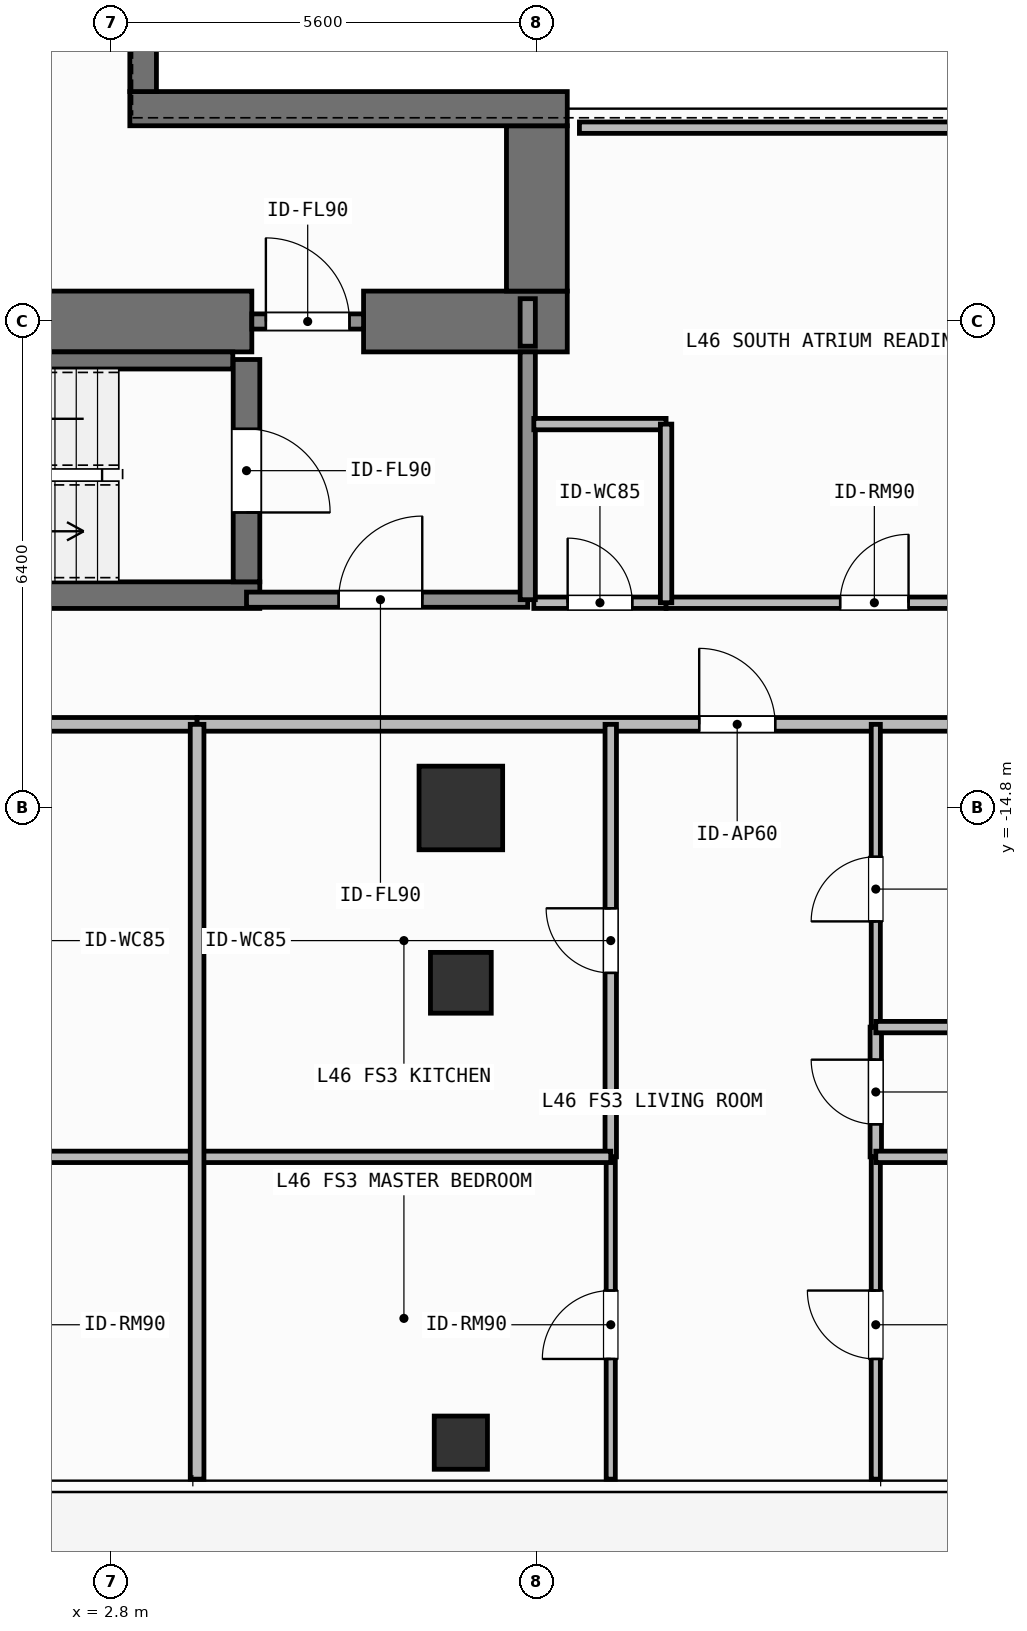
"""IFC4 building model, lengths in metres.
Left out: names, types, materials, properties, quantities, classifications, styles, units other than length and angle.
Written with IfcOpenShell. Run it as: python <this file> out.ifc"""

import sys

from ifc_helpers import new_model, si_unit, direction, frame, frame_2d, origin, origin_2d, place, context, subcontext, project, spatial, rectangle, hollow_rectangle, extrude, element, fill, save


model = new_model("IFC4")
c1 = context("Model", 3, precision=1e-05, world=origin(), true_north=direction((0.0, 1.0)))
c2 = subcontext(c1, "Body", "Model", "MODEL_VIEW")
j1 = project(units=[si_unit("LENGTHUNIT", "METRE"), si_unit("PLANEANGLEUNIT", "RADIAN")], contexts=[c1])
p1 = place(None, origin())
s1 = spatial("IfcSite", under=j1, at=p1, CompositionType="ELEMENT")
p2 = place(p1, origin())
s2 = spatial("IfcBuilding", under=s1, at=p2, CompositionType="ELEMENT")
p3 = place(p2, frame((0.0, 0.0, 187.5)))
s3 = spatial("IfcBuildingStorey", under=s2, at=p3, CompositionType="ELEMENT", Elevation=187.5)
p4 = place(p3, frame((-2.62, -8.4, 0.0), z_axis=(0.0, 0.0, 1.0), x_axis=(1.0, 0.0, 0.0)))
e1 = element("IfcWall", 1, at=p4, inside=s3, PredefinedType="SHEAR", context=c2, shape_type="SweptSolid", body=[
    extrude(rectangle(XDim=7.27, YDim=0.8, at=frame_2d((3.635, 0.0))), origin(), (0.0, 0.0, 1.0), 3.9),
])
p5 = place(p3, frame((6.12, -8.4, 0.0), z_axis=(0.0, 0.0, 1.0), x_axis=(1.0, 0.0, 0.0)))
e2 = element("IfcWall", 2, at=p5, inside=s3, PredefinedType="SHEAR", context=c2, shape_type="SweptSolid", body=[
    extrude(rectangle(XDim=2.68, YDim=0.8, at=frame_2d((1.34, 0.0))), origin(), (0.0, 0.0, 1.0), 3.9),
])
p6 = place(p3, frame((8.4, -8.0, 0.0), z_axis=(0.0, 0.0, 1.0), x_axis=(0.0, 1.0, 0.0)))
e3 = element("IfcWall", 3, at=p6, inside=s3, PredefinedType="SHEAR", context=c2, shape_type="SweptSolid", body=[
    extrude(rectangle(XDim=2.175, YDim=0.8, at=frame_2d((1.087, 0.0))), origin(), (0.0, 0.0, 1.0), 3.9),
])
p7 = place(p3, frame((3.045, -5.6, 0.0), z_axis=(0.0, 0.0, 1.0), x_axis=(1.0, 0.0, 0.0)))
e4 = element("IfcWall", 4, at=p7, inside=s3, PredefinedType="SHEAR", context=c2, shape_type="SweptSolid", body=[
    extrude(rectangle(XDim=5.755, YDim=0.45, at=frame_2d((2.877, 0.0))), origin(), (0.0, 0.0, 1.0), 3.9),
])
p8 = place(p3, frame((3.22, -5.375, 0.0), z_axis=(0.0, 0.0, 1.0), x_axis=(0.0, 1.0, 0.0)))
e5 = element("IfcWall", 5, at=p8, inside=s3, PredefinedType="SHEAR", context=c2, shape_type="SweptSolid", body=[
    extrude(rectangle(XDim=10.75, YDim=0.35, at=frame_2d((5.375, 0.0))), origin(), (0.0, 0.0, 1.0), 3.9),
])
p9 = place(p3, frame((-2.555, -12.0, 0.0), z_axis=(0.0, 0.0, 1.0), x_axis=(1.0, 0.0, 0.0)))
e6 = element("IfcWall", 6, at=p9, inside=s3, PredefinedType="SHEAR", context=c2, shape_type="SweptSolid", body=[
    extrude(rectangle(XDim=7.31, YDim=0.35, at=frame_2d((3.655, 0.0))), origin(), (0.0, 0.0, 1.0), 3.9),
])
p10 = place(p3, frame((-2.2, -8.913, 0.0), z_axis=(0.0, 0.0, 1.0), x_axis=(1.0, 0.0, 0.0)))
e7 = element("IfcWall", 7, at=p10, inside=s3, PredefinedType="SHEAR", context=c2, shape_type="SweptSolid", body=[
    extrude(rectangle(XDim=6.6, YDim=0.225, at=frame_2d((3.3, 0.0))), origin(), (0.0, 0.0, 1.0), 3.9),
])
p11 = place(p3, frame((4.58, -8.9, 0.0), z_axis=(0.0, 0.0, 1.0), x_axis=(0.0, -1.0, 0.0)))
e8 = element("IfcWall", 8, at=p11, inside=s3, PredefinedType="SHEAR", context=c2, shape_type="SweptSolid", body=[
    extrude(rectangle(XDim=2.925, YDim=0.35, at=frame_2d((1.462, 0.0))), origin(), (0.0, 0.0, 1.0), 3.9),
])
p12 = place(p11, frame((0.913, 0.0, 0.0)))
e9 = element("IfcOpeningElement", 9, at=p12, cuts=e8, PredefinedType="OPENING", context=c2, shape_type="SweptSolid", body=[
    extrude(rectangle(XDim=1.1, YDim=2.15, at=frame_2d((0.55, 1.075))), frame((0.0, 0.185, 0.0), z_axis=(0.0, -1.0, 0.0), x_axis=(1.0, 0.0, 0.0)), (0.0, 0.0, 1.0), 0.37),
])
p13 = place(p3, frame((7.4, -14.8, 0.0), z_axis=(0.0, 0.0, 1.0), x_axis=(1.0, 0.0, 0.0)))
e10 = element("IfcColumn", 10, at=p13, inside=s3, PredefinedType="COLUMN", context=c2, shape_type="SweptSolid", body=[
    extrude(rectangle(XDim=1.1, YDim=1.1, at=origin_2d()), origin(), (0.0, 0.0, 1.0), 3.9),
])
p14 = place(p3, frame((7.4, -17.1, 0.0), z_axis=(0.0, 0.0, 1.0), x_axis=(1.0, 0.0, 0.0)))
e11 = element("IfcColumn", 11, at=p14, inside=s3, PredefinedType="COLUMN", context=c2, shape_type="SweptSolid", body=[
    extrude(hollow_rectangle(XDim=0.8, YDim=0.8, WallThickness=0.036, at=origin_2d()), origin(), (0.0, 0.0, 1.0), 3.9),
])
p15 = place(p3, frame((7.4, -23.15, 0.0), z_axis=(0.0, 0.0, 1.0), x_axis=(1.0, 0.0, 0.0)))
e12 = element("IfcColumn", 12, at=p15, inside=s3, PredefinedType="COLUMN", context=c2, shape_type="SweptSolid", body=[
    extrude(hollow_rectangle(XDim=0.7, YDim=0.7, WallThickness=0.032, at=origin_2d()), origin(), (0.0, 0.0, 1.0), 3.9),
])
p16 = place(p3, frame((4.58, -12.06, 0.0), z_axis=(0.0, 0.0, 1.0), x_axis=(1.0, 0.0, 0.0)))
e13 = element("IfcWall", 13, at=p16, inside=s3, PredefinedType="SOLIDWALL", context=c2, shape_type="SweptSolid", body=[
    extrude(rectangle(XDim=3.7, YDim=0.2, at=frame_2d((1.85, 0.0))), origin(), (0.0, 0.0, 1.0), 3.62),
])
p17 = place(p16, frame((1.212, 0.0, 0.0)))
e14 = element("IfcOpeningElement", 14, at=p17, cuts=e13, PredefinedType="OPENING", context=c2, shape_type="SweptSolid", body=[
    extrude(rectangle(XDim=1.1, YDim=2.15, at=frame_2d((0.55, 1.075))), frame((0.0, 0.11, 0.0), z_axis=(0.0, -1.0, 0.0), x_axis=(1.0, 0.0, 0.0)), (0.0, 0.0, 1.0), 0.22),
])
p18 = place(p3, frame((4.65, -8.4, 0.0), z_axis=(0.0, 0.0, 1.0), x_axis=(1.0, 0.0, 0.0)))
e15 = element("IfcWall", 15, at=p18, inside=s3, PredefinedType="SOLIDWALL", context=c2, shape_type="SweptSolid", body=[
    extrude(rectangle(XDim=1.47, YDim=0.2, at=frame_2d((0.735, 0.0))), origin(), (0.0, 0.0, 1.0), 2.76),
])
p19 = place(p18, frame((0.185, 0.0, 0.0)))
e16 = element("IfcOpeningElement", 16, at=p19, cuts=e15, PredefinedType="OPENING", context=c2, shape_type="SweptSolid", body=[
    extrude(rectangle(XDim=1.1, YDim=2.15, at=frame_2d((0.55, 1.075))), frame((0.0, 0.11, 0.0), z_axis=(0.0, -1.0, 0.0), x_axis=(1.0, 0.0, 0.0)), (0.0, 0.0, 1.0), 0.22),
])
p20 = place(p3, frame((8.36, -12.1, 0.0), z_axis=(0.0, 0.0, 1.0), x_axis=(1.0, 0.0, 0.0)))
e17 = element("IfcWall", 17, at=p20, inside=s3, PredefinedType="PARTITIONING", context=c2, shape_type="SweptSolid", body=[
    extrude(rectangle(XDim=1.74, YDim=0.15, at=frame_2d((0.87, 0.0))), origin(), (0.0, 0.0, 1.0), 3.62),
])
p21 = place(p20, frame((0.445, 0.0, 0.0)))
e18 = element("IfcOpeningElement", 18, at=p21, cuts=e17, PredefinedType="OPENING", context=c2, shape_type="SweptSolid", body=[
    extrude(rectangle(XDim=0.85, YDim=2.1, at=frame_2d((0.425, 1.05))), frame((0.0, 0.085, 0.0), z_axis=(0.0, -1.0, 0.0), x_axis=(1.0, 0.0, 0.0)), (0.0, 0.0, 1.0), 0.17),
])
p22 = place(p3, frame((10.1, -12.1, 0.0), z_axis=(0.0, 0.0, 1.0), x_axis=(1.0, 0.0, 0.0)))
e19 = element("IfcWall", 19, at=p22, inside=s3, PredefinedType="PARTITIONING", context=c2, shape_type="SweptSolid", body=[
    extrude(rectangle(XDim=5.48, YDim=0.15, at=frame_2d((2.74, 0.0))), origin(), (0.0, 0.0, 1.0), 3.62),
])
p23 = place(p22, frame((2.29, 0.0, 0.0)))
e20 = element("IfcOpeningElement", 20, at=p23, cuts=e19, PredefinedType="OPENING", context=c2, shape_type="SweptSolid", body=[
    extrude(rectangle(XDim=0.9, YDim=2.1, at=frame_2d((0.45, 1.05))), frame((0.0, 0.085, 0.0), z_axis=(0.0, -1.0, 0.0), x_axis=(1.0, 0.0, 0.0)), (0.0, 0.0, 1.0), 0.17),
])
p24 = place(p3, frame((-6.618, -13.7, 0.0), z_axis=(0.0, 0.0, 1.0), x_axis=(1.0, 0.0, 0.0)))
e21 = element("IfcWall", 21, at=p24, inside=s3, PredefinedType="PARTITIONING", context=c2, shape_type="SweptSolid", body=[
    extrude(rectangle(XDim=10.548, YDim=0.18, at=frame_2d((5.274, 0.0))), origin(), (0.0, 0.0, 1.0), 3.62),
])
p25 = place(p24, frame((4.951, 0.0, 0.0)))
e22 = element("IfcOpeningElement", 22, at=p25, cuts=e21, PredefinedType="OPENING", context=c2, shape_type="SweptSolid", body=[
    extrude(rectangle(XDim=1.0, YDim=2.2, at=frame_2d((0.5, 1.1))), frame((0.0, 0.1, 0.0), z_axis=(0.0, -1.0, 0.0), x_axis=(1.0, 0.0, 0.0)), (0.0, 0.0, 1.0), 0.2),
])
p26 = place(p3, frame((3.93, -13.7, 0.0), z_axis=(0.0, 0.0, 1.0), x_axis=(1.0, 0.0, 0.0)))
e23 = element("IfcWall", 23, at=p26, inside=s3, PredefinedType="PARTITIONING", context=c2, shape_type="SweptSolid", body=[
    extrude(rectangle(XDim=14.39, YDim=0.18, at=frame_2d((7.195, 0.0))), origin(), (0.0, 0.0, 1.0), 3.62),
])
p27 = place(p26, frame((6.605, 0.0, 0.0)))
e24 = element("IfcOpeningElement", 24, at=p27, cuts=e23, PredefinedType="OPENING", context=c2, shape_type="SweptSolid", body=[
    extrude(rectangle(XDim=1.0, YDim=2.2, at=frame_2d((0.5, 1.1))), frame((0.0, 0.1, 0.0), z_axis=(0.0, -1.0, 0.0), x_axis=(1.0, 0.0, 0.0)), (0.0, 0.0, 1.0), 0.2),
])
p28 = place(p3, frame((9.372, -19.39, 0.0), z_axis=(0.0, 0.0, 1.0), x_axis=(0.0, 1.0, 0.0)))
e25 = element("IfcWall", 25, at=p28, inside=s3, PredefinedType="PARTITIONING", context=c2, shape_type="SweptSolid", body=[
    extrude(rectangle(XDim=5.69, YDim=0.15, at=frame_2d((2.845, 0.0))), origin(), (0.0, 0.0, 1.0), 3.62),
])
p29 = place(p28, frame((2.42, 0.0, 0.0)))
e26 = element("IfcOpeningElement", 26, at=p29, cuts=e25, PredefinedType="OPENING", context=c2, shape_type="SweptSolid", body=[
    extrude(rectangle(XDim=0.85, YDim=2.1, at=frame_2d((0.425, 1.05))), frame((0.0, 0.085, 0.0), z_axis=(0.0, -1.0, 0.0), x_axis=(1.0, 0.0, 0.0)), (0.0, 0.0, 1.0), 0.17),
])
p30 = place(p3, frame((9.372, -23.63, 0.0), z_axis=(0.0, 0.0, 1.0), x_axis=(0.0, 1.0, 0.0)))
e27 = element("IfcWall", 27, at=p30, inside=s3, PredefinedType="PARTITIONING", context=c2, shape_type="SweptSolid", body=[
    extrude(rectangle(XDim=4.24, YDim=0.12, at=frame_2d((2.12, 0.0))), origin(), (0.0, 0.0, 1.0), 3.62),
])
p31 = place(p30, frame((1.581, 0.0, 0.0)))
e28 = element("IfcOpeningElement", 28, at=p31, cuts=e27, PredefinedType="OPENING", context=c2, shape_type="SweptSolid", body=[
    extrude(rectangle(XDim=0.9, YDim=2.1, at=frame_2d((0.45, 1.05))), frame((0.0, 0.07, 0.0), z_axis=(0.0, -1.0, 0.0), x_axis=(1.0, 0.0, 0.0)), (0.0, 0.0, 1.0), 0.14),
])
p32 = place(p3, frame((12.859, -19.39, 0.0), z_axis=(0.0, 0.0, 1.0), x_axis=(0.0, 1.0, 0.0)))
e29 = element("IfcWall", 29, at=p32, inside=s3, PredefinedType="PARTITIONING", context=c2, shape_type="SweptSolid", body=[
    extrude(rectangle(XDim=1.707, YDim=0.15, at=frame_2d((0.854, 0.0))), origin(), (0.0, 0.0, 1.0), 3.62),
])
p33 = place(p32, frame((0.428, 0.0, 0.0)))
e30 = element("IfcOpeningElement", 30, at=p33, cuts=e29, PredefinedType="OPENING", context=c2, shape_type="SweptSolid", body=[
    extrude(rectangle(XDim=0.85, YDim=2.1, at=frame_2d((0.425, 1.05))), frame((0.0, 0.085, 0.0), z_axis=(0.0, -1.0, 0.0), x_axis=(1.0, 0.0, 0.0)), (0.0, 0.0, 1.0), 0.17),
])
p34 = place(p3, frame((12.859, -17.683, 0.0), z_axis=(0.0, 0.0, 1.0), x_axis=(0.0, 1.0, 0.0)))
e31 = element("IfcWall", 31, at=p34, inside=s3, PredefinedType="PARTITIONING", context=c2, shape_type="SweptSolid", body=[
    extrude(rectangle(XDim=3.983, YDim=0.12, at=frame_2d((1.992, 0.0))), origin(), (0.0, 0.0, 1.0), 3.62),
])
p35 = place(p34, frame((1.391, 0.0, 0.0)))
e32 = element("IfcOpeningElement", 32, at=p35, cuts=e31, PredefinedType="OPENING", context=c2, shape_type="SweptSolid", body=[
    extrude(rectangle(XDim=0.85, YDim=2.1, at=frame_2d((0.425, 1.05))), frame((0.0, 0.07, 0.0), z_axis=(0.0, -1.0, 0.0), x_axis=(1.0, 0.0, 0.0)), (0.0, 0.0, 1.0), 0.14),
])
p36 = place(p3, frame((12.859, -23.63, 0.0), z_axis=(0.0, 0.0, 1.0), x_axis=(0.0, 1.0, 0.0)))
e33 = element("IfcWall", 33, at=p36, inside=s3, PredefinedType="PARTITIONING", context=c2, shape_type="SweptSolid", body=[
    extrude(rectangle(XDim=4.24, YDim=0.12, at=frame_2d((2.12, 0.0))), origin(), (0.0, 0.0, 1.0), 3.62),
])
p37 = place(p36, frame((1.581, 0.0, 0.0)))
e34 = element("IfcOpeningElement", 34, at=p37, cuts=e33, PredefinedType="OPENING", context=c2, shape_type="SweptSolid", body=[
    extrude(rectangle(XDim=0.9, YDim=2.1, at=frame_2d((0.45, 1.05))), frame((0.0, 0.07, 0.0), z_axis=(0.0, -1.0, 0.0), x_axis=(1.0, 0.0, 0.0)), (0.0, 0.0, 1.0), 0.14),
])
p38 = place(p3, frame((8.28, -12.06, 0.0), z_axis=(0.0, 0.0, 1.0), x_axis=(0.0, 1.0, 0.0)))
e35 = element("IfcWall", 35, at=p38, inside=s3, PredefinedType="SOLIDWALL", context=c2, shape_type="SweptSolid", body=[
    extrude(rectangle(XDim=3.26, YDim=0.2, at=frame_2d((1.63, 0.0))), origin(), (0.0, 0.0, 1.0), 3.62),
])
p39 = place(p3, frame((8.28, -8.725, 0.0), z_axis=(0.0, 0.0, 1.0), x_axis=(0.0, 1.0, 0.0)))
e36 = element("IfcWall", 36, at=p39, inside=s3, PredefinedType="SOLIDWALL", context=c2, shape_type="SweptSolid", body=[
    extrude(rectangle(XDim=0.625, YDim=0.2, at=frame_2d((0.312, 0.0))), origin(), (0.0, 0.0, 1.0), 3.62),
])
p40 = place(p3, frame((8.36, -9.75, 0.0), z_axis=(0.0, 0.0, 1.0), x_axis=(1.0, 0.0, 0.0)))
e37 = element("IfcWall", 37, at=p40, inside=s3, PredefinedType="PARTITIONING", context=c2, shape_type="SweptSolid", body=[
    extrude(rectangle(XDim=1.74, YDim=0.15, at=frame_2d((0.87, 0.0))), origin(), (0.0, 0.0, 1.0), 3.62),
])
p41 = place(p3, frame((10.1, -12.1, 0.0), z_axis=(0.0, 0.0, 1.0), x_axis=(0.0, 1.0, 0.0)))
e38 = element("IfcWall", 38, at=p41, inside=s3, PredefinedType="PARTITIONING", context=c2, shape_type="SweptSolid", body=[
    extrude(rectangle(XDim=2.35, YDim=0.15, at=frame_2d((1.175, 0.0))), origin(), (0.0, 0.0, 1.0), 3.62),
])
p42 = place(p3, frame((8.96, -5.85, 0.0), z_axis=(0.0, 0.0, 1.0), x_axis=(1.0, 0.0, 0.0)))
e39 = element("IfcWall", 39, at=p42, inside=s3, PredefinedType="PARTITIONING", context=c2, shape_type="SweptSolid", body=[
    extrude(rectangle(XDim=6.62, YDim=0.15, at=frame_2d((3.31, 0.0))), origin(), (0.0, 0.0, 1.0), 3.62),
])
p43 = place(p3, frame((1.08, -19.39, 0.0), z_axis=(0.0, 0.0, 1.0), x_axis=(1.0, 0.0, 0.0)))
e40 = element("IfcWall", 40, at=p43, inside=s3, PredefinedType="PARTITIONING", context=c2, shape_type="SweptSolid", body=[
    extrude(rectangle(XDim=2.85, YDim=0.15, at=frame_2d((1.425, 0.0))), origin(), (0.0, 0.0, 1.0), 3.62),
])
p44 = place(p3, frame((3.93, -19.39, 0.0), z_axis=(0.0, 0.0, 1.0), x_axis=(1.0, 0.0, 0.0)))
e41 = element("IfcWall", 41, at=p44, inside=s3, PredefinedType="PARTITIONING", context=c2, shape_type="SweptSolid", body=[
    extrude(rectangle(XDim=5.442, YDim=0.15, at=frame_2d((2.721, 0.0))), origin(), (0.0, 0.0, 1.0), 3.62),
])
for number, where, z_axis, x_axis in (
    (42, (12.859, -17.683, 0.0), (0.0, 0.0, 1.0), (1.0, 0.0, 0.0)),
    (43, (12.859, -19.39, 0.0), (0.0, 0.0, 1.0), (1.0, 0.0, 0.0)),
):
    element("IfcWall", number, at=place(p3, frame(where, z_axis=z_axis, x_axis=x_axis)), inside=s3, PredefinedType="PARTITIONING", context=c2, shape_type="SweptSolid", body=[
        extrude(rectangle(XDim=5.461, YDim=0.15, at=frame_2d((2.73, 0.0))), origin(), (0.0, 0.0, 1.0), 3.62),
    ])
p45 = place(p3, frame((3.93, -23.63, 0.0), z_axis=(0.0, 0.0, 1.0), x_axis=(0.0, 1.0, 0.0)))
e44 = element("IfcWall", 44, at=p45, inside=s3, PredefinedType="PARTITIONING", context=c2, shape_type="SweptSolid", body=[
    extrude(rectangle(XDim=9.93, YDim=0.18, at=frame_2d((4.965, 0.0))), origin(), (0.0, 0.0, 1.0), 3.62),
])
p46 = place(p12, origin())
e45 = element("IfcDoor", 45, at=p46, inside=s3, OperationType="SINGLE_SWING_RIGHT", PredefinedType="DOOR", context=c2, shape_type="SweptSolid", body=[
    extrude(rectangle(XDim=1.1, YDim=2.15, at=frame_2d((0.55, 1.075))), frame((0.0, 0.025, 0.0), z_axis=(0.0, -1.0, 0.0), x_axis=(1.0, 0.0, 0.0)), (0.0, 0.0, 1.0), 0.05),
])
fill(e9, e45)
p47 = place(p17, origin())
e46 = element("IfcDoor", 46, at=p47, inside=s3, OperationType="SINGLE_SWING_RIGHT", PredefinedType="DOOR", context=c2, shape_type="SweptSolid", body=[
    extrude(rectangle(XDim=1.1, YDim=2.15, at=frame_2d((0.55, 1.075))), frame((0.0, 0.025, 0.0), z_axis=(0.0, -1.0, 0.0), x_axis=(1.0, 0.0, 0.0)), (0.0, 0.0, 1.0), 0.05),
])
fill(e14, e46)
p48 = place(p19, origin())
e47 = element("IfcDoor", 47, at=p48, inside=s3, OperationType="SINGLE_SWING_LEFT", PredefinedType="DOOR", context=c2, shape_type="SweptSolid", body=[
    extrude(rectangle(XDim=1.1, YDim=2.15, at=frame_2d((0.55, 1.075))), frame((0.0, 0.025, 0.0), z_axis=(0.0, -1.0, 0.0), x_axis=(1.0, 0.0, 0.0)), (0.0, 0.0, 1.0), 0.05),
])
fill(e16, e47)
p49 = place(p21, origin())
e48 = element("IfcDoor", 48, at=p49, inside=s3, OperationType="SINGLE_SWING_LEFT", PredefinedType="DOOR", context=c2, shape_type="SweptSolid", body=[
    extrude(rectangle(XDim=0.85, YDim=2.1, at=frame_2d((0.425, 1.05))), frame((0.0, 0.025, 0.0), z_axis=(0.0, -1.0, 0.0), x_axis=(1.0, 0.0, 0.0)), (0.0, 0.0, 1.0), 0.05),
])
fill(e18, e48)
p50 = place(p23, origin())
e49 = element("IfcDoor", 49, at=p50, inside=s3, OperationType="SINGLE_SWING_RIGHT", PredefinedType="DOOR", context=c2, shape_type="SweptSolid", body=[
    extrude(rectangle(XDim=0.9, YDim=2.1, at=frame_2d((0.45, 1.05))), frame((0.0, 0.025, 0.0), z_axis=(0.0, -1.0, 0.0), x_axis=(1.0, 0.0, 0.0)), (0.0, 0.0, 1.0), 0.05),
])
fill(e20, e49)
p51 = place(p27, origin())
e50 = element("IfcDoor", 50, at=p51, inside=s3, OperationType="SINGLE_SWING_LEFT", PredefinedType="DOOR", context=c2, shape_type="SweptSolid", body=[
    extrude(rectangle(XDim=1.0, YDim=2.2, at=frame_2d((0.5, 1.1))), frame((0.0, 0.025, 0.0), z_axis=(0.0, -1.0, 0.0), x_axis=(1.0, 0.0, 0.0)), (0.0, 0.0, 1.0), 0.05),
])
fill(e24, e50)
p52 = place(p29, origin())
e51 = element("IfcDoor", 51, at=p52, inside=s3, OperationType="SINGLE_SWING_RIGHT", PredefinedType="DOOR", context=c2, shape_type="SweptSolid", body=[
    extrude(rectangle(XDim=0.85, YDim=2.1, at=frame_2d((0.425, 1.05))), frame((0.0, 0.025, 0.0), z_axis=(0.0, -1.0, 0.0), x_axis=(1.0, 0.0, 0.0)), (0.0, 0.0, 1.0), 0.05),
])
fill(e26, e51)
p53 = place(p31, origin())
e52 = element("IfcDoor", 52, at=p53, inside=s3, OperationType="SINGLE_SWING_LEFT", PredefinedType="DOOR", context=c2, shape_type="SweptSolid", body=[
    extrude(rectangle(XDim=0.9, YDim=2.1, at=frame_2d((0.45, 1.05))), frame((0.0, 0.025, 0.0), z_axis=(0.0, -1.0, 0.0), x_axis=(1.0, 0.0, 0.0)), (0.0, 0.0, 1.0), 0.05),
])
fill(e28, e52)
p54 = place(p33, origin())
e53 = element("IfcDoor", 53, at=p54, inside=s3, OperationType="SINGLE_SWING_RIGHT", PredefinedType="DOOR", context=c2, shape_type="SweptSolid", body=[
    extrude(rectangle(XDim=0.85, YDim=2.1, at=frame_2d((0.425, 1.05))), frame((0.0, 0.025, 0.0), z_axis=(0.0, -1.0, 0.0), x_axis=(1.0, 0.0, 0.0)), (0.0, 0.0, 1.0), 0.05),
])
fill(e30, e53)
p55 = place(p35, origin())
e54 = element("IfcDoor", 54, at=p55, inside=s3, OperationType="SINGLE_SWING_LEFT", PredefinedType="DOOR", context=c2, shape_type="SweptSolid", body=[
    extrude(rectangle(XDim=0.85, YDim=2.1, at=frame_2d((0.425, 1.05))), frame((0.0, 0.025, 0.0), z_axis=(0.0, -1.0, 0.0), x_axis=(1.0, 0.0, 0.0)), (0.0, 0.0, 1.0), 0.05),
])
fill(e32, e54)
p56 = place(p37, origin())
e55 = element("IfcDoor", 55, at=p56, inside=s3, OperationType="SINGLE_SWING_RIGHT", PredefinedType="DOOR", context=c2, shape_type="SweptSolid", body=[
    extrude(rectangle(XDim=0.9, YDim=2.1, at=frame_2d((0.45, 1.05))), frame((0.0, 0.025, 0.0), z_axis=(0.0, -1.0, 0.0), x_axis=(1.0, 0.0, 0.0)), (0.0, 0.0, 1.0), 0.05),
])
fill(e34, e55)
save(model, sys.argv[1])
